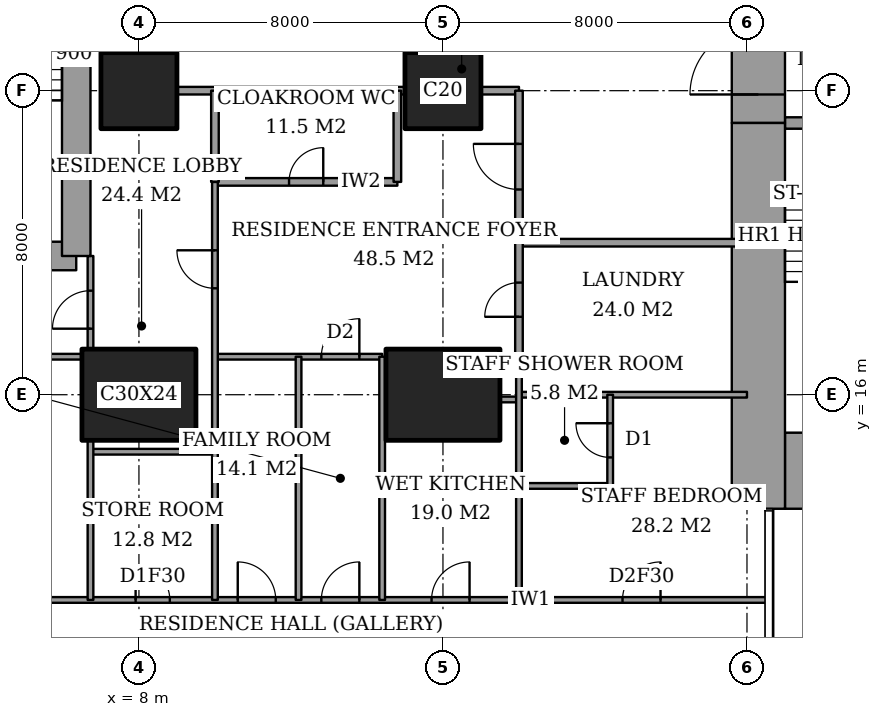
"""IFC4 building model, lengths in metres.
Left out: names, types, materials, properties, quantities, classifications, styles, units other than length and angle.
Written with IfcOpenShell. Run it as: python <this file> out.ifc"""

import sys

from ifc_helpers import new_model, si_unit, direction, frame, frame_2d, origin, origin_2d, place, context, subcontext, project, spatial, rectangle, extrude, element, fill, save


model = new_model("IFC4")
c1 = context("Model", 3, precision=1e-05, world=origin(), true_north=direction((0.0, 1.0)))
c2 = subcontext(c1, "Body", "Model", "MODEL_VIEW")
j1 = project(units=[si_unit("LENGTHUNIT", "METRE"), si_unit("PLANEANGLEUNIT", "RADIAN")], contexts=[c1])
p1 = place(None, origin())
s1 = spatial("IfcSite", under=j1, at=p1, CompositionType="ELEMENT")
p2 = place(p1, origin())
s2 = spatial("IfcBuilding", under=s1, at=p2, CompositionType="ELEMENT")
p3 = place(p2, frame((0.0, 0.0, 121.4)))
s3 = spatial("IfcBuildingStorey", under=s2, at=p3, CompositionType="ELEMENT", Elevation=121.4)
p4 = place(p3, frame((8.0, 16.0, 0.0), z_axis=(0.0, 0.0, 1.0), x_axis=(1.0, 0.0, 0.0)))
e1 = element("IfcColumn", 1, at=p4, inside=s3, PredefinedType="COLUMN", context=c2, shape_type="SweptSolid", body=[
    extrude(rectangle(XDim=3.0, YDim=2.4, at=origin_2d()), origin(), (0.0, 0.0, 1.0), 3.6),
])
p5 = place(p3, frame((8.0, 24.0, 0.0), z_axis=(0.0, 0.0, 1.0), x_axis=(1.0, 0.0, 0.0)))
e2 = element("IfcColumn", 2, at=p5, inside=s3, PredefinedType="COLUMN", context=c2, shape_type="SweptSolid", body=[
    extrude(rectangle(XDim=2.0, YDim=2.0, at=origin_2d()), origin(), (0.0, 0.0, 1.0), 3.6),
])
p6 = place(p3, frame((16.0, 16.0, 0.0), z_axis=(0.0, 0.0, 1.0), x_axis=(1.0, 0.0, 0.0)))
e3 = element("IfcColumn", 3, at=p6, inside=s3, PredefinedType="COLUMN", context=c2, shape_type="SweptSolid", body=[
    extrude(rectangle(XDim=3.0, YDim=2.4, at=origin_2d()), origin(), (0.0, 0.0, 1.0), 3.6),
])
p7 = place(p3, frame((16.0, 24.0, 0.0), z_axis=(0.0, 0.0, 1.0), x_axis=(1.0, 0.0, 0.0)))
e4 = element("IfcColumn", 4, at=p7, inside=s3, PredefinedType="COLUMN", context=c2, shape_type="SweptSolid", body=[
    extrude(rectangle(XDim=2.0, YDim=2.0, at=origin_2d()), origin(), (0.0, 0.0, 1.0), 3.6),
])
p8 = place(p3, frame((25.0, 14.0, 0.0), z_axis=(0.0, 0.0, 1.0), x_axis=(1.0, 0.0, 0.0)))
e5 = element("IfcWall", 5, at=p8, inside=s3, PredefinedType="SHEAR", context=c2, shape_type="SweptSolid", body=[
    extrude(rectangle(XDim=3.15, YDim=2.0, at=frame_2d((1.575, 0.0))), origin(), (0.0, 0.0, 1.0), 3.6),
])
p9 = place(p3, frame((24.3, 13.0, 0.0), z_axis=(0.0, 0.0, 1.0), x_axis=(0.0, 1.0, 0.0)))
e6 = element("IfcWall", 6, at=p9, inside=s3, PredefinedType="SHEAR", context=c2, shape_type="SweptSolid", body=[
    extrude(rectangle(XDim=10.15, YDim=1.4, at=frame_2d((5.075, 0.0))), origin(), (0.0, 0.0, 1.0), 3.6),
])
p10 = place(p3, frame((24.3, 23.15, 0.0), z_axis=(0.0, 0.0, 1.0), x_axis=(0.0, 1.0, 0.0)))
e7 = element("IfcWall", 7, at=p10, inside=s3, PredefinedType="SHEAR", context=c2, shape_type="SweptSolid", body=[
    extrude(rectangle(XDim=11.85, YDim=1.4, at=frame_2d((5.925, 0.0))), origin(), (0.0, 0.0, 1.0), 3.6),
])
p11 = place(p10, frame((0.75, 0.0, 0.0)))
e8 = element("IfcOpeningElement", 8, at=p11, cuts=e7, PredefinedType="OPENING", context=c2, shape_type="SweptSolid", body=[
    extrude(rectangle(XDim=1.8, YDim=2.4, at=frame_2d((0.9, 1.2))), frame((0.0, 0.71, 0.0), z_axis=(0.0, -1.0, 0.0), x_axis=(1.0, 0.0, 0.0)), (0.0, 0.0, 1.0), 1.42),
])
p12 = place(p3, frame((25.0, 23.15, 0.0), z_axis=(0.0, 0.0, 1.0), x_axis=(1.0, 0.0, 0.0)))
e9 = element("IfcWall", 9, at=p12, inside=s3, PredefinedType="SHEAR", context=c2, shape_type="SweptSolid", body=[
    extrude(rectangle(XDim=3.15, YDim=0.3, at=frame_2d((1.575, 0.0))), origin(), (0.0, 0.0, 1.0), 3.6),
])
p13 = place(p12, frame((0.6, 0.0, 0.0)))
e10 = element("IfcOpeningElement", 10, at=p13, cuts=e9, PredefinedType="OPENING", context=c2, shape_type="SweptSolid", body=[
    extrude(rectangle(XDim=1.0, YDim=2.1, at=frame_2d((0.5, 1.05))), frame((0.0, 0.16, 0.0), z_axis=(0.0, -1.0, 0.0), x_axis=(1.0, 0.0, 0.0)), (0.0, 0.0, 1.0), 0.32),
])
p14 = place(p3, frame((1.9, 19.65, 0.0), z_axis=(0.0, 0.0, 1.0), x_axis=(1.0, 0.0, 0.0)))
e11 = element("IfcWall", 11, at=p14, inside=s3, PredefinedType="SHEAR", context=c2, shape_type="SweptSolid", body=[
    extrude(rectangle(XDim=4.45, YDim=0.75, at=frame_2d((2.225, 0.0))), origin(), (0.0, 0.0, 1.0), 3.6),
])
p15 = place(p3, frame((6.35, 19.65, 0.0), z_axis=(0.0, 0.0, 1.0), x_axis=(0.0, 1.0, 0.0)))
e12 = element("IfcWall", 12, at=p15, inside=s3, PredefinedType="SHEAR", context=c2, shape_type="SweptSolid", body=[
    extrude(rectangle(XDim=8.7, YDim=0.75, at=frame_2d((4.35, 0.0))), origin(), (0.0, 0.0, 1.0), 3.6),
])
p16 = place(p15, frame((6.725, 0.0, 0.0)))
e13 = element("IfcOpeningElement", 13, at=p16, cuts=e12, PredefinedType="OPENING", context=c2, shape_type="SweptSolid", body=[
    extrude(rectangle(XDim=1.0, YDim=2.1, at=frame_2d((0.5, 1.05))), frame((0.0, 0.385, 0.0), z_axis=(0.0, -1.0, 0.0), x_axis=(1.0, 0.0, 0.0)), (0.0, 0.0, 1.0), 0.77),
])
p17 = place(p3, frame((-0.45, 10.6, 0.0), z_axis=(0.0, 0.0, 1.0), x_axis=(1.0, 0.0, 0.0)))
e14 = element("IfcWall", 14, at=p17, inside=s3, PredefinedType="PARTITIONING", context=c2, shape_type="SweptSolid", body=[
    extrude(rectangle(XDim=25.011, YDim=0.15, at=frame_2d((12.505, 0.0))), origin(), (0.0, 0.0, 1.0), 3.35),
])
p18 = place(p17, frame((13.25, 0.0, 0.0)))
e15 = element("IfcOpeningElement", 15, at=p18, cuts=e14, PredefinedType="OPENING", context=c2, shape_type="SweptSolid", body=[
    extrude(rectangle(XDim=1.0, YDim=2.1, at=frame_2d((0.5, 1.05))), frame((0.0, 0.085, 0.0), z_axis=(0.0, -1.0, 0.0), x_axis=(1.0, 0.0, 0.0)), (0.0, 0.0, 1.0), 0.17),
])
p19 = place(p17, frame((3.087, 0.0, 0.0)))
e16 = element("IfcOpeningElement", 16, at=p19, cuts=e14, PredefinedType="OPENING", context=c2, shape_type="SweptSolid", body=[
    extrude(rectangle(XDim=1.0, YDim=2.1, at=frame_2d((0.5, 1.05))), frame((0.0, 0.085, 0.0), z_axis=(0.0, -1.0, 0.0), x_axis=(1.0, 0.0, 0.0)), (0.0, 0.0, 1.0), 0.17),
])
p20 = place(p17, frame((8.363, 0.0, 0.0)))
e17 = element("IfcOpeningElement", 17, at=p20, cuts=e14, PredefinedType="OPENING", context=c2, shape_type="SweptSolid", body=[
    extrude(rectangle(XDim=0.9, YDim=2.1, at=frame_2d((0.45, 1.05))), frame((0.0, 0.085, 0.0), z_axis=(0.0, -1.0, 0.0), x_axis=(1.0, 0.0, 0.0)), (0.0, 0.0, 1.0), 0.17),
])
p21 = place(p17, frame((11.05, 0.0, 0.0)))
e18 = element("IfcOpeningElement", 18, at=p21, cuts=e14, PredefinedType="OPENING", context=c2, shape_type="SweptSolid", body=[
    extrude(rectangle(XDim=1.0, YDim=2.1, at=frame_2d((0.5, 1.05))), frame((0.0, 0.085, 0.0), z_axis=(0.0, -1.0, 0.0), x_axis=(1.0, 0.0, 0.0)), (0.0, 0.0, 1.0), 0.17),
])
p22 = place(p17, frame((16.15, 0.0, 0.0)))
e19 = element("IfcOpeningElement", 19, at=p22, cuts=e14, PredefinedType="OPENING", context=c2, shape_type="SweptSolid", body=[
    extrude(rectangle(XDim=1.0, YDim=2.1, at=frame_2d((0.5, 1.05))), frame((0.0, 0.085, 0.0), z_axis=(0.0, -1.0, 0.0), x_axis=(1.0, 0.0, 0.0)), (0.0, 0.0, 1.0), 0.17),
])
p23 = place(p17, frame((21.175, 0.0, 0.0)))
e20 = element("IfcOpeningElement", 20, at=p23, cuts=e14, PredefinedType="OPENING", context=c2, shape_type="SweptSolid", body=[
    extrude(rectangle(XDim=1.0, YDim=2.1, at=frame_2d((0.5, 1.05))), frame((0.0, 0.085, 0.0), z_axis=(0.0, -1.0, 0.0), x_axis=(1.0, 0.0, 0.0)), (0.0, 0.0, 1.0), 0.17),
])
p24 = place(p3, frame((18.0, 13.6, 0.0), z_axis=(0.0, 0.0, 1.0), x_axis=(1.0, 0.0, 0.0)))
e21 = element("IfcWall", 21, at=p24, inside=s3, PredefinedType="PARTITIONING", context=c2, shape_type="SweptSolid", body=[
    extrude(rectangle(XDim=2.4, YDim=0.15, at=frame_2d((1.2, 0.0))), origin(), (0.0, 0.0, 1.0), 3.35),
])
p25 = place(p3, frame((6.725, 14.5, 0.0), z_axis=(0.0, 0.0, 1.0), x_axis=(1.0, 0.0, 0.0)))
e22 = element("IfcWall", 22, at=p25, inside=s3, PredefinedType="PARTITIONING", context=c2, shape_type="SweptSolid", body=[
    extrude(rectangle(XDim=3.275, YDim=0.15, at=frame_2d((1.637, 0.0))), origin(), (0.0, 0.0, 1.0), 3.35),
])
p26 = place(p3, frame((17.5, 15.875, 0.0), z_axis=(0.0, 0.0, 1.0), x_axis=(1.0, 0.0, 0.0)))
e23 = element("IfcWall", 23, at=p26, inside=s3, PredefinedType="PARTITIONING", context=c2, shape_type="SweptSolid", body=[
    extrude(rectangle(XDim=0.5, YDim=0.15, at=frame_2d((0.25, 0.0))), origin(), (0.0, 0.0, 1.0), 2.634),
])
p27 = place(p3, frame((18.0, 16.0, 0.0), z_axis=(0.0, 0.0, 1.0), x_axis=(1.0, 0.0, 0.0)))
e24 = element("IfcWall", 24, at=p27, inside=s3, PredefinedType="PARTITIONING", context=c2, shape_type="SweptSolid", body=[
    extrude(rectangle(XDim=6.0, YDim=0.15, at=frame_2d((3.0, 0.0))), origin(), (0.0, 0.0, 1.0), 2.634),
])
p28 = place(p3, frame((1.35, 17.0, 0.0), z_axis=(0.0, 0.0, 1.0), x_axis=(1.0, 0.0, 0.0)))
e25 = element("IfcWall", 25, at=p28, inside=s3, PredefinedType="PARTITIONING", context=c2, shape_type="SweptSolid", body=[
    extrude(rectangle(XDim=5.15, YDim=0.15, at=frame_2d((2.575, 0.0))), origin(), (0.0, 0.0, 1.0), 3.35),
])
p29 = place(p3, frame((10.0, 17.0, 0.0), z_axis=(0.0, 0.0, 1.0), x_axis=(1.0, 0.0, 0.0)))
e26 = element("IfcWall", 26, at=p29, inside=s3, PredefinedType="PARTITIONING", context=c2, shape_type="SweptSolid", body=[
    extrude(rectangle(XDim=4.4, YDim=0.15, at=frame_2d((2.2, 0.0))), origin(), (0.0, 0.0, 1.0), 3.35),
])
p30 = place(p29, frame((2.8, 0.0, 0.0)))
e27 = element("IfcOpeningElement", 27, at=p30, cuts=e26, PredefinedType="OPENING", context=c2, shape_type="SweptSolid", body=[
    extrude(rectangle(XDim=1.0, YDim=2.1, at=frame_2d((0.5, 1.05))), frame((0.0, 0.085, 0.0), z_axis=(0.0, -1.0, 0.0), x_axis=(1.0, 0.0, 0.0)), (0.0, 0.0, 1.0), 0.17),
])
p31 = place(p3, frame((18.0, 20.0, 0.0), z_axis=(0.0, 0.0, 1.0), x_axis=(1.0, 0.0, 0.0)))
e28 = element("IfcWall", 28, at=p31, inside=s3, PredefinedType="PARTITIONING", context=c2, shape_type="SweptSolid", body=[
    extrude(rectangle(XDim=6.0, YDim=0.2, at=frame_2d((3.0, 0.0))), origin(), (0.0, 0.0, 1.0), 3.35),
])
p32 = place(p3, frame((10.0, 21.6, 0.0), z_axis=(0.0, 0.0, 1.0), x_axis=(1.0, 0.0, 0.0)))
e29 = element("IfcWall", 29, at=p32, inside=s3, PredefinedType="PARTITIONING", context=c2, shape_type="SweptSolid", body=[
    extrude(rectangle(XDim=4.8, YDim=0.2, at=frame_2d((2.4, 0.0))), origin(), (0.0, 0.0, 1.0), 3.35),
])
p33 = place(p32, frame((1.95, 0.0, 0.0)))
e30 = element("IfcOpeningElement", 30, at=p33, cuts=e29, PredefinedType="OPENING", context=c2, shape_type="SweptSolid", body=[
    extrude(rectangle(XDim=0.9, YDim=2.1, at=frame_2d((0.45, 1.05))), frame((0.0, 0.11, 0.0), z_axis=(0.0, -1.0, 0.0), x_axis=(1.0, 0.0, 0.0)), (0.0, 0.0, 1.0), 0.22),
])
p34 = place(p3, frame((9.0, 24.0, 0.0), z_axis=(0.0, 0.0, 1.0), x_axis=(1.0, 0.0, 0.0)))
e31 = element("IfcWall", 31, at=p34, inside=s3, PredefinedType="PARTITIONING", context=c2, shape_type="SweptSolid", body=[
    extrude(rectangle(XDim=6.0, YDim=0.2, at=frame_2d((3.0, 0.0))), origin(), (0.0, 0.0, 1.0), 3.35),
])
p35 = place(p3, frame((17.0, 24.0, 0.0), z_axis=(0.0, 0.0, 1.0), x_axis=(1.0, 0.0, 0.0)))
e32 = element("IfcWall", 32, at=p35, inside=s3, PredefinedType="PARTITIONING", context=c2, shape_type="SweptSolid", body=[
    extrude(rectangle(XDim=1.0, YDim=0.2, at=frame_2d((0.5, 0.0))), origin(), (0.0, 0.0, 1.0), 3.35),
])
p36 = place(p3, frame((6.725, 10.6, 0.0), z_axis=(0.0, 0.0, 1.0), x_axis=(0.0, 1.0, 0.0)))
e33 = element("IfcWall", 33, at=p36, inside=s3, PredefinedType="PARTITIONING", context=c2, shape_type="SweptSolid", body=[
    extrude(rectangle(XDim=4.2, YDim=0.15, at=frame_2d((2.1, 0.0))), origin(), (0.0, 0.0, 1.0), 3.35),
])
p37 = place(p3, frame((6.725, 17.2, 0.0), z_axis=(0.0, 0.0, 1.0), x_axis=(0.0, 1.0, 0.0)))
e34 = element("IfcWall", 34, at=p37, inside=s3, PredefinedType="PARTITIONING", context=c2, shape_type="SweptSolid", body=[
    extrude(rectangle(XDim=2.45, YDim=0.15, at=frame_2d((1.225, 0.0))), origin(), (0.0, 0.0, 1.0), 3.35),
])
p38 = place(p37, frame((0.538, 0.0, 0.0)))
e35 = element("IfcOpeningElement", 35, at=p38, cuts=e34, PredefinedType="OPENING", context=c2, shape_type="SweptSolid", body=[
    extrude(rectangle(XDim=1.0, YDim=2.1, at=frame_2d((0.5, 1.05))), frame((0.0, 0.085, 0.0), z_axis=(0.0, -1.0, 0.0), x_axis=(1.0, 0.0, 0.0)), (0.0, 0.0, 1.0), 0.17),
])
p39 = place(p3, frame((10.0, 21.6, 0.0), z_axis=(0.0, 0.0, 1.0), x_axis=(0.0, 1.0, 0.0)))
e36 = element("IfcWall", 36, at=p39, inside=s3, PredefinedType="PARTITIONING", context=c2, shape_type="SweptSolid", body=[
    extrude(rectangle(XDim=2.4, YDim=0.2, at=frame_2d((1.2, 0.0))), origin(), (0.0, 0.0, 1.0), 3.35),
])
p40 = place(p3, frame((10.0, 10.6, 0.0), z_axis=(0.0, 0.0, 1.0), x_axis=(0.0, 1.0, 0.0)))
e37 = element("IfcWall", 37, at=p40, inside=s3, PredefinedType="PARTITIONING", context=c2, shape_type="SweptSolid", body=[
    extrude(rectangle(XDim=11.0, YDim=0.15, at=frame_2d((5.5, 0.0))), origin(), (0.0, 0.0, 1.0), 3.35),
])
p41 = place(p40, frame((8.2, 0.0, 0.0)))
e38 = element("IfcOpeningElement", 38, at=p41, cuts=e37, PredefinedType="OPENING", context=c2, shape_type="SweptSolid", body=[
    extrude(rectangle(XDim=1.0, YDim=2.1, at=frame_2d((0.5, 1.05))), frame((0.0, 0.085, 0.0), z_axis=(0.0, -1.0, 0.0), x_axis=(1.0, 0.0, 0.0)), (0.0, 0.0, 1.0), 0.17),
])
for number, where, z_axis, x_axis in (
    (39, (12.2, 10.6, 0.0), (0.0, 0.0, 1.0), (0.0, 1.0, 0.0)),
    (40, (14.4, 10.6, 0.0), (0.0, 0.0, 1.0), (0.0, 1.0, 0.0)),
):
    element("IfcWall", number, at=place(p3, frame(where, z_axis=z_axis, x_axis=x_axis)), inside=s3, PredefinedType="PARTITIONING", context=c2, shape_type="SweptSolid", body=[
        extrude(rectangle(XDim=6.4, YDim=0.15, at=frame_2d((3.2, 0.0))), origin(), (0.0, 0.0, 1.0), 3.35),
    ])
p42 = place(p3, frame((14.8, 21.6, 0.0), z_axis=(0.0, 0.0, 1.0), x_axis=(0.0, 1.0, 0.0)))
e41 = element("IfcWall", 41, at=p42, inside=s3, PredefinedType="PARTITIONING", context=c2, shape_type="SweptSolid", body=[
    extrude(rectangle(XDim=2.4, YDim=0.2, at=frame_2d((1.2, 0.0))), origin(), (0.0, 0.0, 1.0), 3.35),
])
p43 = place(p3, frame((18.0, 17.0, 0.0), z_axis=(0.0, 0.0, 1.0), x_axis=(0.0, 1.0, 0.0)))
e42 = element("IfcWall", 42, at=p43, inside=s3, PredefinedType="PARTITIONING", context=c2, shape_type="SweptSolid", body=[
    extrude(rectangle(XDim=7.0, YDim=0.2, at=frame_2d((3.5, 0.0))), origin(), (0.0, 0.0, 1.0), 3.35),
])
p44 = place(p43, frame((4.4, 0.0, 0.0)))
e43 = element("IfcOpeningElement", 43, at=p44, cuts=e42, PredefinedType="OPENING", context=c2, shape_type="SweptSolid", body=[
    extrude(rectangle(XDim=1.2, YDim=2.4, at=frame_2d((0.6, 1.2))), frame((0.0, 0.11, 0.0), z_axis=(0.0, -1.0, 0.0), x_axis=(1.0, 0.0, 0.0)), (0.0, 0.0, 1.0), 0.22),
])
p45 = place(p43, frame((1.05, 0.0, 0.0)))
e44 = element("IfcOpeningElement", 44, at=p45, cuts=e42, PredefinedType="OPENING", context=c2, shape_type="SweptSolid", body=[
    extrude(rectangle(XDim=0.9, YDim=2.1, at=frame_2d((0.45, 1.05))), frame((0.0, 0.11, 0.0), z_axis=(0.0, -1.0, 0.0), x_axis=(1.0, 0.0, 0.0)), (0.0, 0.0, 1.0), 0.22),
])
p46 = place(p3, frame((18.0, 10.6, 0.0), z_axis=(0.0, 0.0, 1.0), x_axis=(0.0, 1.0, 0.0)))
e45 = element("IfcWall", 45, at=p46, inside=s3, PredefinedType="PARTITIONING", context=c2, shape_type="SweptSolid", body=[
    extrude(rectangle(XDim=6.4, YDim=0.15, at=frame_2d((3.2, 0.0))), origin(), (0.0, 0.0, 1.0), 3.35),
])
p47 = place(p3, frame((20.4, 13.6, 0.0), z_axis=(0.0, 0.0, 1.0), x_axis=(0.0, 1.0, 0.0)))
e46 = element("IfcWall", 46, at=p47, inside=s3, PredefinedType="PARTITIONING", context=c2, shape_type="SweptSolid", body=[
    extrude(rectangle(XDim=2.4, YDim=0.15, at=frame_2d((1.2, 0.0))), origin(), (0.0, 0.0, 1.0), 3.35),
])
p48 = place(p47, frame((0.75, 0.0, 0.0)))
e47 = element("IfcOpeningElement", 47, at=p48, cuts=e46, PredefinedType="OPENING", context=c2, shape_type="SweptSolid", body=[
    extrude(rectangle(XDim=0.9, YDim=2.1, at=frame_2d((0.45, 1.05))), frame((0.0, 0.085, 0.0), z_axis=(0.0, -1.0, 0.0), x_axis=(1.0, 0.0, 0.0)), (0.0, 0.0, 1.0), 0.17),
])
p49 = place(p18, origin())
e48 = element("IfcDoor", 48, at=p49, inside=s3, OperationType="SINGLE_SWING_LEFT", PredefinedType="DOOR", context=c2, shape_type="SweptSolid", body=[
    extrude(rectangle(XDim=1.0, YDim=2.1, at=frame_2d((0.5, 1.05))), frame((0.0, 0.025, 0.0), z_axis=(0.0, -1.0, 0.0), x_axis=(1.0, 0.0, 0.0)), (0.0, 0.0, 1.0), 0.05),
])
fill(e15, e48)
p50 = place(p38, origin())
e49 = element("IfcDoor", 49, at=p50, inside=s3, OperationType="SINGLE_SWING_RIGHT", PredefinedType="DOOR", context=c2, shape_type="SweptSolid", body=[
    extrude(rectangle(XDim=1.0, YDim=2.1, at=frame_2d((0.5, 1.05))), frame((0.0, 0.025, 0.0), z_axis=(0.0, -1.0, 0.0), x_axis=(1.0, 0.0, 0.0)), (0.0, 0.0, 1.0), 0.05),
])
fill(e35, e49)
p51 = place(p20, origin())
e50 = element("IfcDoor", 50, at=p51, inside=s3, OperationType="SINGLE_SWING_RIGHT", PredefinedType="DOOR", context=c2, shape_type="SweptSolid", body=[
    extrude(rectangle(XDim=0.9, YDim=2.1, at=frame_2d((0.45, 1.05))), frame((0.0, 0.025, 0.0), z_axis=(0.0, -1.0, 0.0), x_axis=(1.0, 0.0, 0.0)), (0.0, 0.0, 1.0), 0.05),
])
fill(e17, e50)
p52 = place(p41, origin())
e51 = element("IfcDoor", 51, at=p52, inside=s3, OperationType="SINGLE_SWING_LEFT", PredefinedType="DOOR", context=c2, shape_type="SweptSolid", body=[
    extrude(rectangle(XDim=1.0, YDim=2.1, at=frame_2d((0.5, 1.05))), frame((0.0, 0.025, 0.0), z_axis=(0.0, -1.0, 0.0), x_axis=(1.0, 0.0, 0.0)), (0.0, 0.0, 1.0), 0.05),
])
fill(e38, e51)
p53 = place(p33, origin())
e52 = element("IfcDoor", 52, at=p53, inside=s3, OperationType="SINGLE_SWING_LEFT", PredefinedType="DOOR", context=c2, shape_type="SweptSolid", body=[
    extrude(rectangle(XDim=0.9, YDim=2.1, at=frame_2d((0.45, 1.05))), frame((0.0, 0.025, 0.0), z_axis=(0.0, -1.0, 0.0), x_axis=(1.0, 0.0, 0.0)), (0.0, 0.0, 1.0), 0.05),
])
fill(e30, e52)
p54 = place(p44, origin())
e53 = element("IfcDoor", 53, at=p54, inside=s3, OperationType="SINGLE_SWING_LEFT", PredefinedType="DOOR", context=c2, shape_type="SweptSolid", body=[
    extrude(rectangle(XDim=1.2, YDim=2.4, at=frame_2d((0.6, 1.2))), frame((0.0, 0.025, 0.0), z_axis=(0.0, -1.0, 0.0), x_axis=(1.0, 0.0, 0.0)), (0.0, 0.0, 1.0), 0.05),
])
fill(e43, e53)
p55 = place(p21, origin())
e54 = element("IfcDoor", 54, at=p55, inside=s3, OperationType="SINGLE_SWING_RIGHT", PredefinedType="DOOR", context=c2, shape_type="SweptSolid", body=[
    extrude(rectangle(XDim=1.0, YDim=2.1, at=frame_2d((0.5, 1.05))), frame((0.0, 0.025, 0.0), z_axis=(0.0, -1.0, 0.0), x_axis=(1.0, 0.0, 0.0)), (0.0, 0.0, 1.0), 0.05),
])
fill(e18, e54)
p56 = place(p30, origin())
e55 = element("IfcDoor", 55, at=p56, inside=s3, OperationType="SINGLE_SWING_LEFT", PredefinedType="DOOR", context=c2, shape_type="SweptSolid", body=[
    extrude(rectangle(XDim=1.0, YDim=2.1, at=frame_2d((0.5, 1.05))), frame((0.0, 0.025, 0.0), z_axis=(0.0, -1.0, 0.0), x_axis=(1.0, 0.0, 0.0)), (0.0, 0.0, 1.0), 0.05),
])
fill(e27, e55)
p57 = place(p22, origin())
e56 = element("IfcDoor", 56, at=p57, inside=s3, OperationType="SINGLE_SWING_LEFT", PredefinedType="DOOR", context=c2, shape_type="SweptSolid", body=[
    extrude(rectangle(XDim=1.0, YDim=2.1, at=frame_2d((0.5, 1.05))), frame((0.0, 0.025, 0.0), z_axis=(0.0, -1.0, 0.0), x_axis=(1.0, 0.0, 0.0)), (0.0, 0.0, 1.0), 0.05),
])
fill(e19, e56)
p58 = place(p48, origin())
e57 = element("IfcDoor", 57, at=p58, inside=s3, OperationType="SINGLE_SWING_LEFT", PredefinedType="DOOR", context=c2, shape_type="SweptSolid", body=[
    extrude(rectangle(XDim=0.9, YDim=2.1, at=frame_2d((0.45, 1.05))), frame((0.0, 0.025, 0.0), z_axis=(0.0, -1.0, 0.0), x_axis=(1.0, 0.0, 0.0)), (0.0, 0.0, 1.0), 0.05),
])
fill(e47, e57)
p59 = place(p23, origin())
e58 = element("IfcDoor", 58, at=p59, inside=s3, OperationType="SINGLE_SWING_LEFT", PredefinedType="DOOR", context=c2, shape_type="SweptSolid", body=[
    extrude(rectangle(XDim=1.0, YDim=2.1, at=frame_2d((0.5, 1.05))), frame((0.0, 0.025, 0.0), z_axis=(0.0, -1.0, 0.0), x_axis=(1.0, 0.0, 0.0)), (0.0, 0.0, 1.0), 0.05),
])
fill(e20, e58)
p60 = place(p45, origin())
e59 = element("IfcDoor", 59, at=p60, inside=s3, OperationType="SINGLE_SWING_RIGHT", PredefinedType="DOOR", context=c2, shape_type="SweptSolid", body=[
    extrude(rectangle(XDim=0.9, YDim=2.1, at=frame_2d((0.45, 1.05))), frame((0.0, 0.025, 0.0), z_axis=(0.0, -1.0, 0.0), x_axis=(1.0, 0.0, 0.0)), (0.0, 0.0, 1.0), 0.05),
])
fill(e44, e59)
p61 = place(p11, origin())
e60 = element("IfcDoor", 60, at=p61, inside=s3, OperationType="DOUBLE_DOOR_DOUBLE_SWING", PredefinedType="DOOR", context=c2, shape_type="SweptSolid", body=[
    extrude(rectangle(XDim=1.8, YDim=2.4, at=frame_2d((0.9, 1.2))), frame((0.0, 0.025, 0.0), z_axis=(0.0, -1.0, 0.0), x_axis=(1.0, 0.0, 0.0)), (0.0, 0.0, 1.0), 0.05),
])
fill(e8, e60)
save(model, sys.argv[1])
